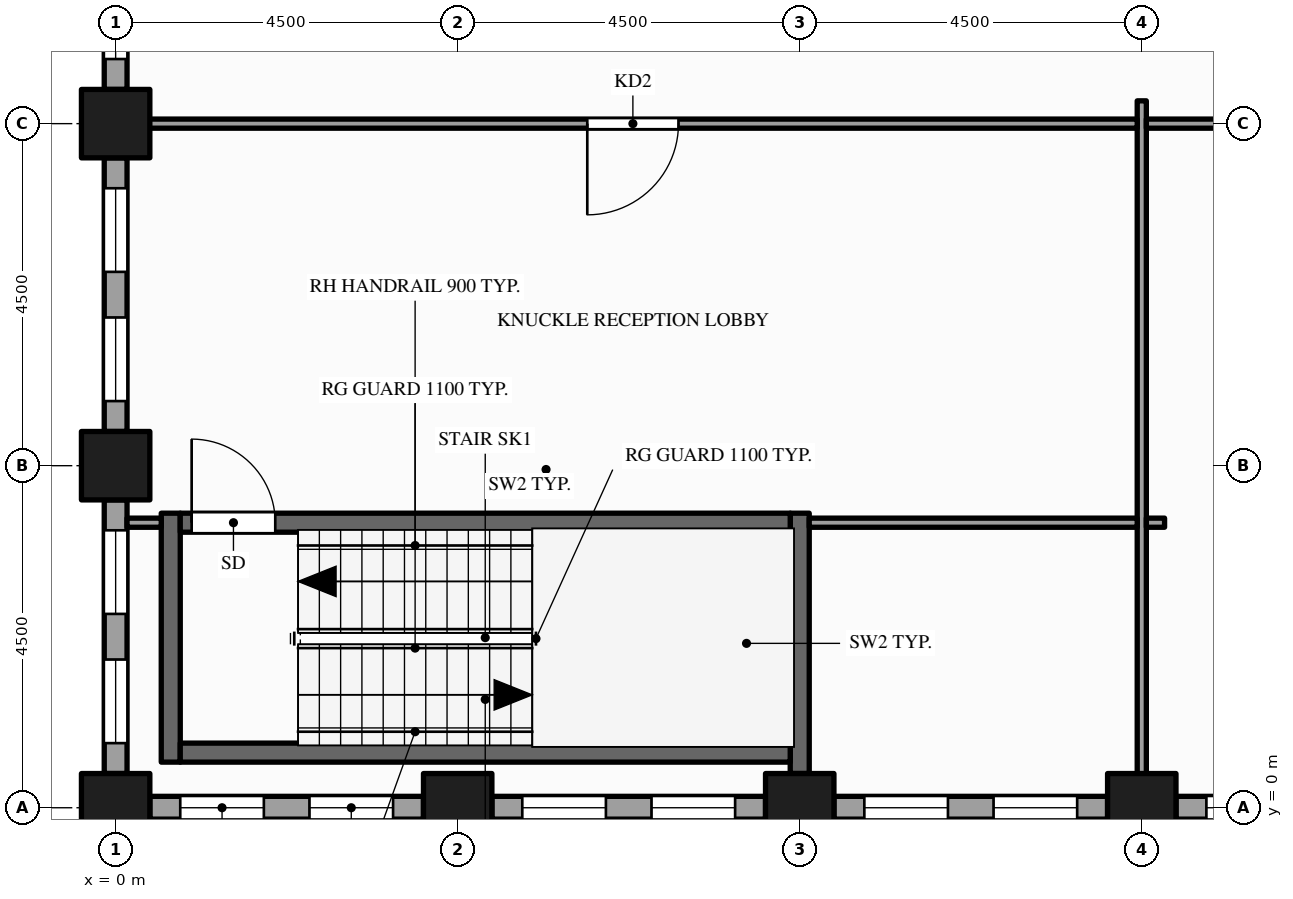
"""IFC4 building model, lengths in metres.
Left out: names, types, materials, properties, quantities, classifications, styles, units other than length and angle.
Written with IfcOpenShell. Run it as: python <this file> out.ifc"""

import sys

from ifc_helpers import new_model, si_unit, direction, frame, frame_2d, origin, origin_2d, place, context, subcontext, project, spatial, rectangle, hollow_rectangle, extrude, element, fill, save


model = new_model("IFC4")
c1 = context("Model", 3, precision=1e-05, world=origin(), true_north=direction((0.0, 1.0)))
c2 = subcontext(c1, "Body", "Model", "MODEL_VIEW")
j1 = project(units=[si_unit("LENGTHUNIT", "METRE"), si_unit("PLANEANGLEUNIT", "RADIAN")], contexts=[c1])
p1 = place(None, origin())
s1 = spatial("IfcSite", under=j1, at=p1, CompositionType="ELEMENT")
p2 = place(p1, origin())
s2 = spatial("IfcBuilding", under=s1, at=p2, CompositionType="ELEMENT")
p3 = place(p2, frame((0.0, 0.0, 183.0)))
s3 = spatial("IfcBuildingStorey", under=s2, at=p3, CompositionType="ELEMENT", Elevation=183.0)
for number, where, z_axis, x_axis in (
    (1, (0.0, 0.0, -0.15), (0.0, 0.0, 1.0), (1.0, 0.0, 0.0)),
    (2, (0.0, 4.5, -0.15), (0.0, 0.0, 1.0), (1.0, 0.0, 0.0)),
    (3, (0.0, 9.0, -0.15), (0.0, 0.0, 1.0), (1.0, 0.0, 0.0)),
    (4, (4.5, 0.0, -0.15), (0.0, 0.0, 1.0), (1.0, 0.0, 0.0)),
    (5, (9.0, 0.0, -0.15), (0.0, 0.0, 1.0), (1.0, 0.0, 0.0)),
    (6, (13.5, 0.0, -0.15), (0.0, 0.0, 1.0), (1.0, 0.0, 0.0)),
):
    element("IfcColumn", number, at=place(p3, frame(where, z_axis=z_axis, x_axis=x_axis)), inside=s3, PredefinedType="COLUMN", context=c2, shape_type="SweptSolid", body=[
        extrude(hollow_rectangle(XDim=0.9, YDim=0.9, WallThickness=0.045, at=origin_2d()), origin(), (0.0, 0.0, 1.0), 3.9),
    ])
p4 = place(p3, frame((0.45, 0.0, 0.0), z_axis=(0.0, 0.0, 1.0), x_axis=(1.0, 0.0, 0.0)))
e7 = element("IfcWall", 7, at=p4, inside=s3, PredefinedType="STANDARD", context=c2, shape_type="SweptSolid", body=[
    extrude(rectangle(XDim=3.6, YDim=0.3, at=frame_2d((1.8, 0.0))), origin(), (0.0, 0.0, 1.0), 3.049),
])
p5 = place(p4, frame((0.4, 0.0, 0.9)))
e8 = element("IfcOpeningElement", 8, at=p5, cuts=e7, PredefinedType="OPENING", context=c2, shape_type="SweptSolid", body=[
    extrude(rectangle(XDim=1.1, YDim=2.0, at=frame_2d((0.55, 1.0))), frame((0.0, 0.16, 0.0), z_axis=(0.0, -1.0, 0.0), x_axis=(1.0, 0.0, 0.0)), (0.0, 0.0, 1.0), 0.32),
])
p6 = place(p4, frame((2.1, 0.0, 0.9)))
e9 = element("IfcOpeningElement", 9, at=p6, cuts=e7, PredefinedType="OPENING", context=c2, shape_type="SweptSolid", body=[
    extrude(rectangle(XDim=1.1, YDim=2.0, at=frame_2d((0.55, 1.0))), frame((0.0, 0.16, 0.0), z_axis=(0.0, -1.0, 0.0), x_axis=(1.0, 0.0, 0.0)), (0.0, 0.0, 1.0), 0.32),
])
p7 = place(p3, frame((4.95, 0.0, 0.0), z_axis=(0.0, 0.0, 1.0), x_axis=(1.0, 0.0, 0.0)))
e10 = element("IfcWall", 10, at=p7, inside=s3, PredefinedType="STANDARD", context=c2, shape_type="SweptSolid", body=[
    extrude(rectangle(XDim=3.6, YDim=0.3, at=frame_2d((1.8, 0.0))), origin(), (0.0, 0.0, 1.0), 3.049),
])
p8 = place(p7, frame((0.4, 0.0, 0.9)))
e11 = element("IfcOpeningElement", 11, at=p8, cuts=e10, PredefinedType="OPENING", context=c2, shape_type="SweptSolid", body=[
    extrude(rectangle(XDim=1.1, YDim=2.0, at=frame_2d((0.55, 1.0))), frame((0.0, 0.16, 0.0), z_axis=(0.0, -1.0, 0.0), x_axis=(1.0, 0.0, 0.0)), (0.0, 0.0, 1.0), 0.32),
])
p9 = place(p7, frame((2.1, 0.0, 0.9)))
e12 = element("IfcOpeningElement", 12, at=p9, cuts=e10, PredefinedType="OPENING", context=c2, shape_type="SweptSolid", body=[
    extrude(rectangle(XDim=1.1, YDim=2.0, at=frame_2d((0.55, 1.0))), frame((0.0, 0.16, 0.0), z_axis=(0.0, -1.0, 0.0), x_axis=(1.0, 0.0, 0.0)), (0.0, 0.0, 1.0), 0.32),
])
p10 = place(p3, frame((9.45, 0.0, 0.0), z_axis=(0.0, 0.0, 1.0), x_axis=(1.0, 0.0, 0.0)))
e13 = element("IfcWall", 13, at=p10, inside=s3, PredefinedType="STANDARD", context=c2, shape_type="SweptSolid", body=[
    extrude(rectangle(XDim=3.6, YDim=0.3, at=frame_2d((1.8, 0.0))), origin(), (0.0, 0.0, 1.0), 3.049),
])
p11 = place(p10, frame((0.4, 0.0, 0.9)))
e14 = element("IfcOpeningElement", 14, at=p11, cuts=e13, PredefinedType="OPENING", context=c2, shape_type="SweptSolid", body=[
    extrude(rectangle(XDim=1.1, YDim=2.0, at=frame_2d((0.55, 1.0))), frame((0.0, 0.16, 0.0), z_axis=(0.0, -1.0, 0.0), x_axis=(1.0, 0.0, 0.0)), (0.0, 0.0, 1.0), 0.32),
])
p12 = place(p10, frame((2.1, 0.0, 0.9)))
e15 = element("IfcOpeningElement", 15, at=p12, cuts=e13, PredefinedType="OPENING", context=c2, shape_type="SweptSolid", body=[
    extrude(rectangle(XDim=1.1, YDim=2.0, at=frame_2d((0.55, 1.0))), frame((0.0, 0.16, 0.0), z_axis=(0.0, -1.0, 0.0), x_axis=(1.0, 0.0, 0.0)), (0.0, 0.0, 1.0), 0.32),
])
p13 = place(p3, frame((13.95, 0.0, 0.0), z_axis=(0.0, 0.0, 1.0), x_axis=(1.0, 0.0, 0.0)))
e16 = element("IfcWall", 16, at=p13, inside=s3, PredefinedType="STANDARD", context=c2, shape_type="SweptSolid", body=[
    extrude(rectangle(XDim=3.6, YDim=0.3, at=frame_2d((1.8, 0.0))), origin(), (0.0, 0.0, 1.0), 3.049),
])
p14 = place(p13, frame((0.4, 0.0, 0.9)))
e17 = element("IfcOpeningElement", 17, at=p14, cuts=e16, PredefinedType="OPENING", context=c2, shape_type="SweptSolid", body=[
    extrude(rectangle(XDim=1.1, YDim=2.0, at=frame_2d((0.55, 1.0))), frame((0.0, 0.16, 0.0), z_axis=(0.0, -1.0, 0.0), x_axis=(1.0, 0.0, 0.0)), (0.0, 0.0, 1.0), 0.32),
])
p15 = place(p13, frame((2.1, 0.0, 0.9)))
e18 = element("IfcOpeningElement", 18, at=p15, cuts=e16, PredefinedType="OPENING", context=c2, shape_type="SweptSolid", body=[
    extrude(rectangle(XDim=1.1, YDim=2.0, at=frame_2d((0.55, 1.0))), frame((0.0, 0.16, 0.0), z_axis=(0.0, -1.0, 0.0), x_axis=(1.0, 0.0, 0.0)), (0.0, 0.0, 1.0), 0.32),
])
p16 = place(p3, frame((0.0, 13.05, 0.0), z_axis=(0.0, 0.0, 1.0), x_axis=(0.0, -1.0, 0.0)))
e19 = element("IfcWall", 19, at=p16, inside=s3, PredefinedType="STANDARD", context=c2, shape_type="SweptSolid", body=[
    extrude(rectangle(XDim=3.6, YDim=0.3, at=frame_2d((1.8, 0.0))), origin(), (0.0, 0.0, 1.0), 3.049),
])
p17 = place(p16, frame((0.4, 0.0, 0.9)))
e20 = element("IfcOpeningElement", 20, at=p17, cuts=e19, PredefinedType="OPENING", context=c2, shape_type="SweptSolid", body=[
    extrude(rectangle(XDim=1.1, YDim=2.0, at=frame_2d((0.55, 1.0))), frame((0.0, 0.16, 0.0), z_axis=(0.0, -1.0, 0.0), x_axis=(1.0, 0.0, 0.0)), (0.0, 0.0, 1.0), 0.32),
])
p18 = place(p16, frame((2.1, 0.0, 0.9)))
e21 = element("IfcOpeningElement", 21, at=p18, cuts=e19, PredefinedType="OPENING", context=c2, shape_type="SweptSolid", body=[
    extrude(rectangle(XDim=1.1, YDim=2.0, at=frame_2d((0.55, 1.0))), frame((0.0, 0.16, 0.0), z_axis=(0.0, -1.0, 0.0), x_axis=(1.0, 0.0, 0.0)), (0.0, 0.0, 1.0), 0.32),
])
p19 = place(p3, frame((0.0, 8.55, 0.0), z_axis=(0.0, 0.0, 1.0), x_axis=(0.0, -1.0, 0.0)))
e22 = element("IfcWall", 22, at=p19, inside=s3, PredefinedType="STANDARD", context=c2, shape_type="SweptSolid", body=[
    extrude(rectangle(XDim=3.6, YDim=0.3, at=frame_2d((1.8, 0.0))), origin(), (0.0, 0.0, 1.0), 3.049),
])
p20 = place(p19, frame((0.4, 0.0, 0.9)))
e23 = element("IfcOpeningElement", 23, at=p20, cuts=e22, PredefinedType="OPENING", context=c2, shape_type="SweptSolid", body=[
    extrude(rectangle(XDim=1.1, YDim=2.0, at=frame_2d((0.55, 1.0))), frame((0.0, 0.16, 0.0), z_axis=(0.0, -1.0, 0.0), x_axis=(1.0, 0.0, 0.0)), (0.0, 0.0, 1.0), 0.32),
])
p21 = place(p19, frame((2.1, 0.0, 0.9)))
e24 = element("IfcOpeningElement", 24, at=p21, cuts=e22, PredefinedType="OPENING", context=c2, shape_type="SweptSolid", body=[
    extrude(rectangle(XDim=1.1, YDim=2.0, at=frame_2d((0.55, 1.0))), frame((0.0, 0.16, 0.0), z_axis=(0.0, -1.0, 0.0), x_axis=(1.0, 0.0, 0.0)), (0.0, 0.0, 1.0), 0.32),
])
p22 = place(p3, frame((0.0, 4.05, 0.0), z_axis=(0.0, 0.0, 1.0), x_axis=(0.0, -1.0, 0.0)))
e25 = element("IfcWall", 25, at=p22, inside=s3, PredefinedType="STANDARD", context=c2, shape_type="SweptSolid", body=[
    extrude(rectangle(XDim=3.6, YDim=0.3, at=frame_2d((1.8, 0.0))), origin(), (0.0, 0.0, 1.0), 3.049),
])
p23 = place(p22, frame((0.4, 0.0, 0.9)))
e26 = element("IfcOpeningElement", 26, at=p23, cuts=e25, PredefinedType="OPENING", context=c2, shape_type="SweptSolid", body=[
    extrude(rectangle(XDim=1.1, YDim=2.0, at=frame_2d((0.55, 1.0))), frame((0.0, 0.16, 0.0), z_axis=(0.0, -1.0, 0.0), x_axis=(1.0, 0.0, 0.0)), (0.0, 0.0, 1.0), 0.32),
])
p24 = place(p22, frame((2.1, 0.0, 0.9)))
e27 = element("IfcOpeningElement", 27, at=p24, cuts=e25, PredefinedType="OPENING", context=c2, shape_type="SweptSolid", body=[
    extrude(rectangle(XDim=1.1, YDim=2.0, at=frame_2d((0.55, 1.0))), frame((0.0, 0.16, 0.0), z_axis=(0.0, -1.0, 0.0), x_axis=(1.0, 0.0, 0.0)), (0.0, 0.0, 1.0), 0.32),
])
p25 = place(p3, frame((0.725, 0.6, 0.0), z_axis=(0.0, 0.0, 1.0), x_axis=(0.0, 1.0, 0.0)))
e28 = element("IfcWall", 28, at=p25, inside=s3, PredefinedType="SHEAR", context=c2, shape_type="SweptSolid", body=[
    extrude(rectangle(XDim=3.275, YDim=0.25, at=frame_2d((1.637, 0.0))), origin(), (0.0, 0.0, 1.0), 3.75),
])
p26 = place(p3, frame((9.0, 0.45, 0.0), z_axis=(0.0, 0.0, 1.0), x_axis=(0.0, 1.0, 0.0)))
e29 = element("IfcWall", 29, at=p26, inside=s3, PredefinedType="SHEAR", context=c2, shape_type="SweptSolid", body=[
    extrude(rectangle(XDim=3.425, YDim=0.25, at=frame_2d((1.712, 0.0))), origin(), (0.0, 0.0, 1.0), 3.75),
])
p27 = place(p3, frame((13.5, 0.15, 0.0), z_axis=(0.0, 0.0, 1.0), x_axis=(0.0, 1.0, 0.0)))
e30 = element("IfcWall", 30, at=p27, inside=s3, PredefinedType="PARTITIONING", context=c2, shape_type="SweptSolid", body=[
    extrude(rectangle(XDim=9.15, YDim=0.12, at=frame_2d((4.575, 0.0))), origin(), (0.0, 0.0, 1.0), 2.77),
])
p28 = place(p3, frame((0.85, 0.725, 0.0), z_axis=(0.0, 0.0, 1.0), x_axis=(1.0, 0.0, 0.0)))
e31 = element("IfcWall", 31, at=p28, inside=s3, PredefinedType="SHEAR", context=c2, shape_type="SweptSolid", body=[
    extrude(rectangle(XDim=8.025, YDim=0.25, at=frame_2d((4.012, 0.0))), origin(), (0.0, 0.0, 1.0), 3.75),
])
p29 = place(p3, frame((0.15, 3.75, 0.0), z_axis=(0.0, 0.0, 1.0), x_axis=(1.0, 0.0, 0.0)))
e32 = element("IfcWall", 32, at=p29, inside=s3, PredefinedType="PARTITIONING", context=c2, shape_type="SweptSolid", body=[
    extrude(rectangle(XDim=0.45, YDim=0.12, at=frame_2d((0.225, 0.0))), origin(), (0.0, 0.0, 1.0), 3.75),
])
p30 = place(p3, frame((0.85, 3.75, 0.0), z_axis=(0.0, 0.0, 1.0), x_axis=(1.0, 0.0, 0.0)))
e33 = element("IfcWall", 33, at=p30, inside=s3, PredefinedType="SHEAR", context=c2, shape_type="SweptSolid", body=[
    extrude(rectangle(XDim=8.025, YDim=0.25, at=frame_2d((4.012, 0.0))), origin(), (0.0, 0.0, 1.0), 3.75),
])
p31 = place(p30, frame((0.15, 0.0, 0.0)))
e34 = element("IfcOpeningElement", 34, at=p31, cuts=e33, PredefinedType="OPENING", context=c2, shape_type="SweptSolid", body=[
    extrude(rectangle(XDim=1.1, YDim=2.1, at=frame_2d((0.55, 1.05))), frame((0.0, 0.135, 0.0), z_axis=(0.0, -1.0, 0.0), x_axis=(1.0, 0.0, 0.0)), (0.0, 0.0, 1.0), 0.27),
])
p32 = place(p3, frame((9.125, 3.75, 0.0), z_axis=(0.0, 0.0, 1.0), x_axis=(1.0, 0.0, 0.0)))
e35 = element("IfcWall", 35, at=p32, inside=s3, PredefinedType="PARTITIONING", context=c2, shape_type="SweptSolid", body=[
    extrude(rectangle(XDim=4.315, YDim=0.12, at=frame_2d((2.157, 0.0))), origin(), (0.0, 0.0, 1.0), 2.77),
])
p33 = place(p3, frame((13.56, 3.75, 0.0), z_axis=(0.0, 0.0, 1.0), x_axis=(1.0, 0.0, 0.0)))
e36 = element("IfcWall", 36, at=p33, inside=s3, PredefinedType="PARTITIONING", context=c2, shape_type="SweptSolid", body=[
    extrude(rectangle(XDim=0.24, YDim=0.12, at=frame_2d((0.12, 0.0))), origin(), (0.0, 0.0, 1.0), 2.77),
])
p34 = place(p3, frame((0.15, 9.0, 0.0), z_axis=(0.0, 0.0, 1.0), x_axis=(1.0, 0.0, 0.0)))
e37 = element("IfcWall", 37, at=p34, inside=s3, PredefinedType="PARTITIONING", context=c2, shape_type="SweptSolid", body=[
    extrude(rectangle(XDim=13.29, YDim=0.12, at=frame_2d((6.645, 0.0))), origin(), (0.0, 0.0, 1.0), 2.77),
])
p35 = place(p34, frame((6.055, 0.0, 0.0)))
e38 = element("IfcOpeningElement", 38, at=p35, cuts=e37, PredefinedType="OPENING", context=c2, shape_type="SweptSolid", body=[
    extrude(rectangle(XDim=1.2, YDim=2.1, at=frame_2d((0.6, 1.05))), frame((0.0, 0.07, 0.0), z_axis=(0.0, -1.0, 0.0), x_axis=(1.0, 0.0, 0.0)), (0.0, 0.0, 1.0), 0.14),
])
p36 = place(p3, frame((13.56, 9.0, 0.0), z_axis=(0.0, 0.0, 1.0), x_axis=(1.0, 0.0, 0.0)))
e39 = element("IfcWall", 39, at=p36, inside=s3, PredefinedType="PARTITIONING", context=c2, shape_type="SweptSolid", body=[
    extrude(rectangle(XDim=8.88, YDim=0.12, at=frame_2d((4.44, 0.0))), origin(), (0.0, 0.0, 1.0), 2.77),
])
p37 = place(p36, frame((3.54, 0.0, 0.0)))
e40 = element("IfcOpeningElement", 40, at=p37, cuts=e39, PredefinedType="OPENING", context=c2, shape_type="SweptSolid", body=[
    extrude(rectangle(XDim=1.8, YDim=2.1, at=frame_2d((0.9, 1.05))), frame((0.0, 0.07, 0.0), z_axis=(0.0, -1.0, 0.0), x_axis=(1.0, 0.0, 0.0)), (0.0, 0.0, 1.0), 0.14),
])
p38 = place(p5, origin())
e41 = element("IfcWindow", 41, at=p38, inside=s3, PartitioningType="SINGLE_PANEL", PredefinedType="WINDOW", context=c2, shape_type="SweptSolid", body=[
    extrude(rectangle(XDim=1.1, YDim=2.0, at=frame_2d((0.55, 1.0))), frame((0.0, 0.03, 0.0), z_axis=(0.0, -1.0, 0.0), x_axis=(1.0, 0.0, 0.0)), (0.0, 0.0, 1.0), 0.06),
])
fill(e8, e41)
p39 = place(p6, origin())
e42 = element("IfcWindow", 42, at=p39, inside=s3, PartitioningType="SINGLE_PANEL", PredefinedType="WINDOW", context=c2, shape_type="SweptSolid", body=[
    extrude(rectangle(XDim=1.1, YDim=2.0, at=frame_2d((0.55, 1.0))), frame((0.0, 0.03, 0.0), z_axis=(0.0, -1.0, 0.0), x_axis=(1.0, 0.0, 0.0)), (0.0, 0.0, 1.0), 0.06),
])
fill(e9, e42)
p40 = place(p8, origin())
e43 = element("IfcWindow", 43, at=p40, inside=s3, PartitioningType="SINGLE_PANEL", PredefinedType="WINDOW", context=c2, shape_type="SweptSolid", body=[
    extrude(rectangle(XDim=1.1, YDim=2.0, at=frame_2d((0.55, 1.0))), frame((0.0, 0.03, 0.0), z_axis=(0.0, -1.0, 0.0), x_axis=(1.0, 0.0, 0.0)), (0.0, 0.0, 1.0), 0.06),
])
fill(e11, e43)
p41 = place(p9, origin())
e44 = element("IfcWindow", 44, at=p41, inside=s3, PartitioningType="SINGLE_PANEL", PredefinedType="WINDOW", context=c2, shape_type="SweptSolid", body=[
    extrude(rectangle(XDim=1.1, YDim=2.0, at=frame_2d((0.55, 1.0))), frame((0.0, 0.03, 0.0), z_axis=(0.0, -1.0, 0.0), x_axis=(1.0, 0.0, 0.0)), (0.0, 0.0, 1.0), 0.06),
])
fill(e12, e44)
p42 = place(p11, origin())
e45 = element("IfcWindow", 45, at=p42, inside=s3, PartitioningType="SINGLE_PANEL", PredefinedType="WINDOW", context=c2, shape_type="SweptSolid", body=[
    extrude(rectangle(XDim=1.1, YDim=2.0, at=frame_2d((0.55, 1.0))), frame((0.0, 0.03, 0.0), z_axis=(0.0, -1.0, 0.0), x_axis=(1.0, 0.0, 0.0)), (0.0, 0.0, 1.0), 0.06),
])
fill(e14, e45)
p43 = place(p12, origin())
e46 = element("IfcWindow", 46, at=p43, inside=s3, PartitioningType="SINGLE_PANEL", PredefinedType="WINDOW", context=c2, shape_type="SweptSolid", body=[
    extrude(rectangle(XDim=1.1, YDim=2.0, at=frame_2d((0.55, 1.0))), frame((0.0, 0.03, 0.0), z_axis=(0.0, -1.0, 0.0), x_axis=(1.0, 0.0, 0.0)), (0.0, 0.0, 1.0), 0.06),
])
fill(e15, e46)
p44 = place(p14, origin())
e47 = element("IfcWindow", 47, at=p44, inside=s3, PartitioningType="SINGLE_PANEL", PredefinedType="WINDOW", context=c2, shape_type="SweptSolid", body=[
    extrude(rectangle(XDim=1.1, YDim=2.0, at=frame_2d((0.55, 1.0))), frame((0.0, 0.03, 0.0), z_axis=(0.0, -1.0, 0.0), x_axis=(1.0, 0.0, 0.0)), (0.0, 0.0, 1.0), 0.06),
])
fill(e17, e47)
p45 = place(p18, origin())
e48 = element("IfcWindow", 48, at=p45, inside=s3, PartitioningType="SINGLE_PANEL", PredefinedType="WINDOW", context=c2, shape_type="SweptSolid", body=[
    extrude(rectangle(XDim=1.1, YDim=2.0, at=frame_2d((0.55, 1.0))), frame((0.0, 0.03, 0.0), z_axis=(0.0, -1.0, 0.0), x_axis=(1.0, 0.0, 0.0)), (0.0, 0.0, 1.0), 0.06),
])
fill(e21, e48)
p46 = place(p20, origin())
e49 = element("IfcWindow", 49, at=p46, inside=s3, PartitioningType="SINGLE_PANEL", PredefinedType="WINDOW", context=c2, shape_type="SweptSolid", body=[
    extrude(rectangle(XDim=1.1, YDim=2.0, at=frame_2d((0.55, 1.0))), frame((0.0, 0.03, 0.0), z_axis=(0.0, -1.0, 0.0), x_axis=(1.0, 0.0, 0.0)), (0.0, 0.0, 1.0), 0.06),
])
fill(e23, e49)
p47 = place(p21, origin())
e50 = element("IfcWindow", 50, at=p47, inside=s3, PartitioningType="SINGLE_PANEL", PredefinedType="WINDOW", context=c2, shape_type="SweptSolid", body=[
    extrude(rectangle(XDim=1.1, YDim=2.0, at=frame_2d((0.55, 1.0))), frame((0.0, 0.03, 0.0), z_axis=(0.0, -1.0, 0.0), x_axis=(1.0, 0.0, 0.0)), (0.0, 0.0, 1.0), 0.06),
])
fill(e24, e50)
p48 = place(p23, origin())
e51 = element("IfcWindow", 51, at=p48, inside=s3, PartitioningType="SINGLE_PANEL", PredefinedType="WINDOW", context=c2, shape_type="SweptSolid", body=[
    extrude(rectangle(XDim=1.1, YDim=2.0, at=frame_2d((0.55, 1.0))), frame((0.0, 0.03, 0.0), z_axis=(0.0, -1.0, 0.0), x_axis=(1.0, 0.0, 0.0)), (0.0, 0.0, 1.0), 0.06),
])
fill(e26, e51)
p49 = place(p24, origin())
e52 = element("IfcWindow", 52, at=p49, inside=s3, PartitioningType="SINGLE_PANEL", PredefinedType="WINDOW", context=c2, shape_type="SweptSolid", body=[
    extrude(rectangle(XDim=1.1, YDim=2.0, at=frame_2d((0.55, 1.0))), frame((0.0, 0.03, 0.0), z_axis=(0.0, -1.0, 0.0), x_axis=(1.0, 0.0, 0.0)), (0.0, 0.0, 1.0), 0.06),
])
fill(e27, e52)
p50 = place(p31, origin())
e53 = element("IfcDoor", 53, at=p50, inside=s3, OperationType="SINGLE_SWING_LEFT", PredefinedType="DOOR", context=c2, shape_type="SweptSolid", body=[
    extrude(rectangle(XDim=1.1, YDim=2.1, at=frame_2d((0.55, 1.05))), frame((0.0, 0.025, 0.0), z_axis=(0.0, -1.0, 0.0), x_axis=(1.0, 0.0, 0.0)), (0.0, 0.0, 1.0), 0.05),
])
fill(e34, e53)
p51 = place(p35, origin())
e54 = element("IfcDoor", 54, at=p51, inside=s3, OperationType="SINGLE_SWING_LEFT", PredefinedType="DOOR", context=c2, shape_type="SweptSolid", body=[
    extrude(rectangle(XDim=1.2, YDim=2.1, at=frame_2d((0.6, 1.05))), frame((0.0, 0.025, 0.0), z_axis=(0.0, -1.0, 0.0), x_axis=(1.0, 0.0, 0.0)), (0.0, 0.0, 1.0), 0.05),
])
fill(e38, e54)
save(model, sys.argv[1])
